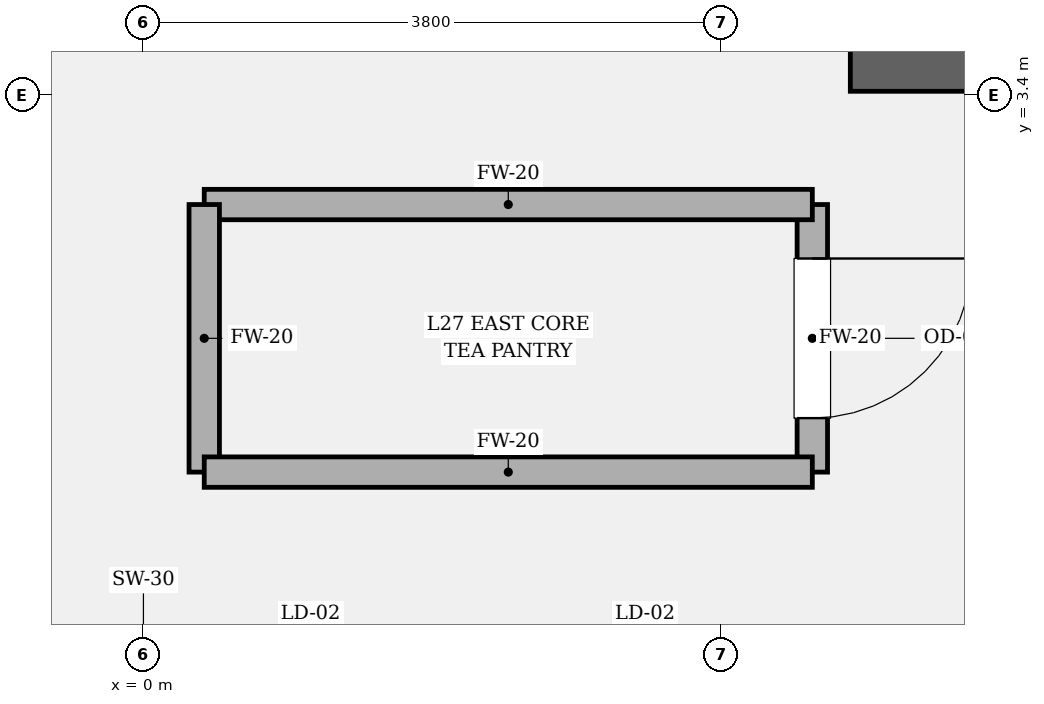
"""IFC4 building model, lengths in metres.
Left out: names, types, materials, properties, quantities, classifications, styles, units other than length and angle.
Written with IfcOpenShell. Run it as: python <this file> out.ifc"""

import sys

from ifc_helpers import new_model, si_unit, direction, frame, frame_2d, origin, place, context, subcontext, project, spatial, rectangle, extrude, element, fill, save


model = new_model("IFC4")
c1 = context("Model", 3, precision=1e-05, world=origin(), true_north=direction((0.0, 1.0)))
c2 = subcontext(c1, "Body", "Model", "MODEL_VIEW")
j1 = project(units=[si_unit("LENGTHUNIT", "METRE"), si_unit("PLANEANGLEUNIT", "RADIAN")], contexts=[c1])
p1 = place(None, origin())
s1 = spatial("IfcSite", under=j1, at=p1, CompositionType="ELEMENT")
p2 = place(p1, origin())
s2 = spatial("IfcBuilding", under=s1, at=p2, CompositionType="ELEMENT")
p3 = place(p2, frame((0.0, 0.0, 117.3)))
s3 = spatial("IfcBuildingStorey", under=s2, at=p3, CompositionType="ELEMENT", Elevation=117.3)
p4 = place(p3, frame((4.65, 3.6, 0.0), z_axis=(0.0, 0.0, 1.0), x_axis=(1.0, 0.0, 0.0)))
e1 = element("IfcWall", 1, at=p4, inside=s3, PredefinedType="SOLIDWALL", context=c2, shape_type="SweptSolid", body=[
    extrude(rectangle(XDim=5.175, YDim=0.35, at=frame_2d((2.587, 0.0))), origin(), (0.0, 0.0, 1.0), 4.05),
])
p5 = place(p3, frame((4.4, 0.92, 0.0), z_axis=(0.0, 0.0, 1.0), x_axis=(0.0, 1.0, 0.0)))
e2 = element("IfcWall", 2, at=p5, inside=s3, PredefinedType="SOLIDWALL", context=c2, shape_type="SweptSolid", body=[
    extrude(rectangle(XDim=1.76, YDim=0.2, at=frame_2d((0.88, 0.0))), origin(), (0.0, 0.0, 1.0), 3.81),
])
p6 = place(p5, frame((0.355, 0.0, 0.0)))
e3 = element("IfcOpeningElement", 3, at=p6, cuts=e2, PredefinedType="OPENING", context=c2, shape_type="SweptSolid", body=[
    extrude(rectangle(XDim=1.05, YDim=2.2, at=frame_2d((0.525, 1.1))), frame((0.0, 0.11, 0.0), z_axis=(0.0, -1.0, 0.0), x_axis=(1.0, 0.0, 0.0)), (0.0, 0.0, 1.0), 0.22),
])
p7 = place(p3, frame((4.4, 2.68, 0.0), z_axis=(0.0, 0.0, 1.0), x_axis=(-1.0, 0.0, 0.0)))
e4 = element("IfcWall", 4, at=p7, inside=s3, PredefinedType="SOLIDWALL", context=c2, shape_type="SweptSolid", body=[
    extrude(rectangle(XDim=4.0, YDim=0.2, at=frame_2d((2.0, 0.0))), origin(), (0.0, 0.0, 1.0), 3.81),
])
p8 = place(p3, frame((0.4, 2.68, 0.0), z_axis=(0.0, 0.0, 1.0), x_axis=(0.0, -1.0, 0.0)))
e5 = element("IfcWall", 5, at=p8, inside=s3, PredefinedType="SOLIDWALL", context=c2, shape_type="SweptSolid", body=[
    extrude(rectangle(XDim=1.76, YDim=0.2, at=frame_2d((0.88, 0.0))), origin(), (0.0, 0.0, 1.0), 3.81),
])
p9 = place(p3, frame((0.4, 0.92, 0.0), z_axis=(0.0, 0.0, 1.0), x_axis=(1.0, 0.0, 0.0)))
e6 = element("IfcWall", 6, at=p9, inside=s3, PredefinedType="SOLIDWALL", context=c2, shape_type="SweptSolid", body=[
    extrude(rectangle(XDim=4.0, YDim=0.2, at=frame_2d((2.0, 0.0))), origin(), (0.0, 0.0, 1.0), 3.81),
])
p10 = place(p6, origin())
e7 = element("IfcDoor", 7, at=p10, inside=s3, OperationType="SINGLE_SWING_RIGHT", PredefinedType="DOOR", context=c2, shape_type="SweptSolid", body=[
    extrude(rectangle(XDim=1.05, YDim=2.2, at=frame_2d((0.525, 1.1))), frame((0.0, 0.025, 0.0), z_axis=(0.0, -1.0, 0.0), x_axis=(1.0, 0.0, 0.0)), (0.0, 0.0, 1.0), 0.05),
])
fill(e3, e7)
save(model, sys.argv[1])
